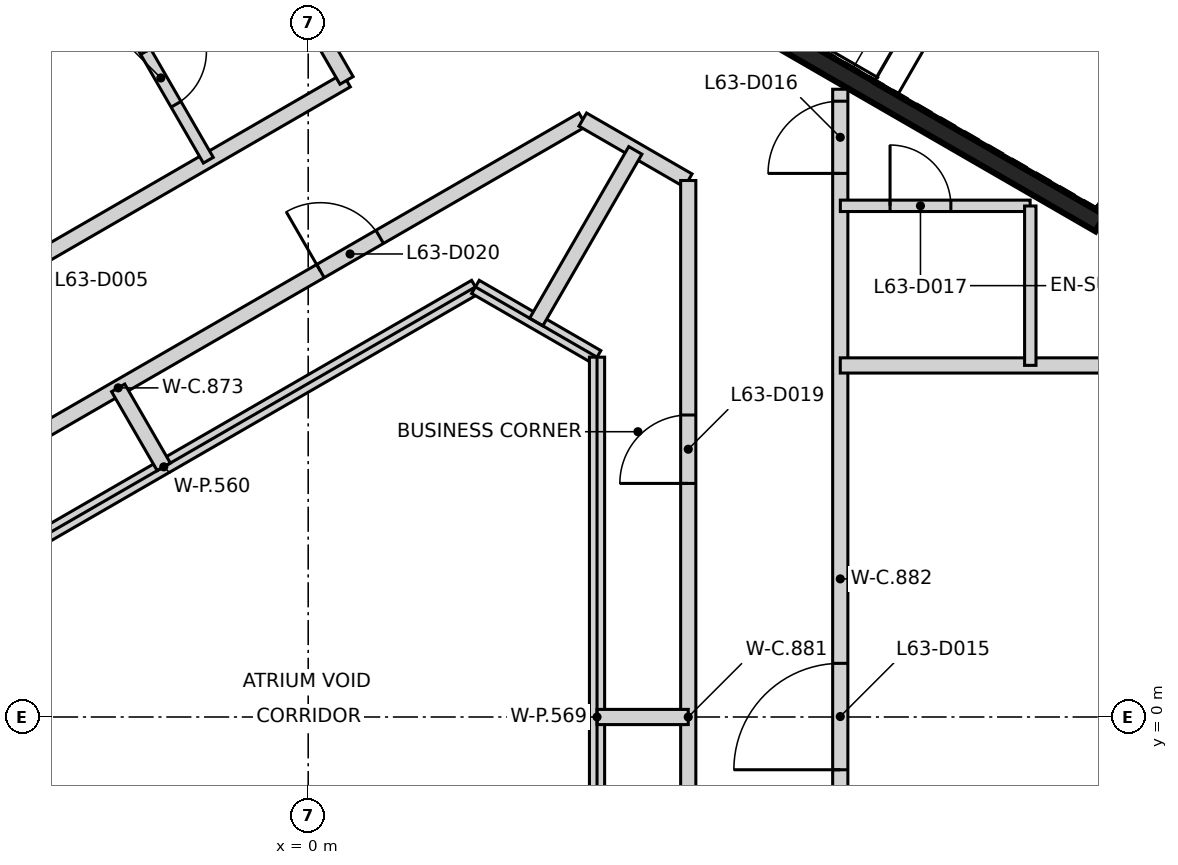
"""IFC4 building model, lengths in metres.
Left out: names, types, materials, properties, quantities, classifications, styles, units other than length and angle.
Written with IfcOpenShell. Run it as: python <this file> out.ifc"""

import sys

from ifc_helpers import new_model, si_unit, direction, frame, frame_2d, origin, place, context, subcontext, project, spatial, rectangle, extrude, element, fill, save


model = new_model("IFC4")
c1 = context("Model", 3, precision=1e-05, world=origin(), true_north=direction((0.0, 1.0)))
c2 = subcontext(c1, "Body", "Model", "MODEL_VIEW")
j1 = project(units=[si_unit("LENGTHUNIT", "METRE"), si_unit("PLANEANGLEUNIT", "RADIAN")], contexts=[c1])
p1 = place(None, origin())
s1 = spatial("IfcSite", under=j1, at=p1, CompositionType="ELEMENT")
p2 = place(p1, origin())
s2 = spatial("IfcBuilding", under=s1, at=p2, CompositionType="ELEMENT")
p3 = place(p2, frame((0.0, 0.0, 250.2)))
s3 = spatial("IfcBuildingStorey", under=s2, at=p3, CompositionType="ELEMENT", Elevation=250.2)
p4 = place(p3, frame((10.42, 6.498, 0.0), z_axis=(0.0, 0.0, 1.0), x_axis=(-0.866021906294, 0.500006057782, 0.0)))
e1 = element("IfcWall", 1, at=p4, inside=s3, PredefinedType="SHEAR", context=c2, shape_type="SweptSolid", body=[
    extrude(rectangle(XDim=11.55, YDim=0.25, at=frame_2d((5.775, 0.0))), origin(), (0.0, 0.0, 1.0), 3.25),
])
p5 = place(p4, frame((10.025, 0.0, 0.0)))
e2 = element("IfcOpeningElement", 2, at=p5, cuts=e1, PredefinedType="OPENING", context=c2, shape_type="SweptSolid", body=[
    extrude(rectangle(XDim=1.2, YDim=2.1, at=frame_2d((0.6, 1.05))), frame((0.0, 0.135, 0.0), z_axis=(0.0, -1.0, 0.0), x_axis=(1.0, 0.0, 0.0)), (0.0, 0.0, 1.0), 0.27),
])
p6 = place(p4, frame((8.725, 0.0, 0.0)))
e3 = element("IfcOpeningElement", 3, at=p6, cuts=e1, PredefinedType="OPENING", context=c2, shape_type="SweptSolid", body=[
    extrude(rectangle(XDim=1.2, YDim=2.1, at=frame_2d((0.6, 1.05))), frame((0.0, 0.135, 0.0), z_axis=(0.0, -1.0, 0.0), x_axis=(1.0, 0.0, 0.0)), (0.0, 0.0, 1.0), 0.27),
])
p7 = place(p3, frame((13.238, 11.378, 0.0), z_axis=(0.0, 0.0, 1.0), x_axis=(-0.500008851346, -0.866020293397, 0.0)))
e4 = element("IfcWall", 4, at=p7, inside=s3, PredefinedType="SHEAR", context=c2, shape_type="SweptSolid", body=[
    extrude(rectangle(XDim=5.51, YDim=0.25, at=frame_2d((2.755, 0.0))), origin(), (0.0, 0.0, 1.0), 3.25),
])
p8 = place(p3, frame((-10.652, 1.928, 0.0), z_axis=(0.0, 0.0, 1.0), x_axis=(0.865793573301, 0.500401327367, 0.0)))
e5 = element("IfcWall", 5, at=p8, inside=s3, PredefinedType="PARTITIONING", context=c2, shape_type="SweptSolid", body=[
    extrude(rectangle(XDim=12.886, YDim=0.2, at=frame_2d((6.443, 0.0))), origin(), (0.0, 0.0, 1.0), 3.25),
])
p9 = place(p8, frame((7.123, 0.0, 0.0)))
e6 = element("IfcOpeningElement", 6, at=p9, cuts=e5, PredefinedType="OPENING", context=c2, shape_type="SweptSolid", body=[
    extrude(rectangle(XDim=0.95, YDim=2.1, at=frame_2d((0.475, 1.05))), frame((0.0, 0.11, 0.0), z_axis=(0.0, -1.0, 0.0), x_axis=(1.0, 0.0, 0.0)), (0.0, 0.0, 1.0), 0.22),
])
p10 = place(p8, frame((0.16, 0.0, 0.0)))
e7 = element("IfcOpeningElement", 7, at=p10, cuts=e5, PredefinedType="OPENING", context=c2, shape_type="SweptSolid", body=[
    extrude(rectangle(XDim=0.95, YDim=2.1, at=frame_2d((0.475, 1.05))), frame((0.0, 0.11, 0.0), z_axis=(0.0, -1.0, 0.0), x_axis=(1.0, 0.0, 0.0)), (0.0, 0.0, 1.0), 0.22),
])
p11 = place(p3, frame((-8.612, -0.801, 0.0), z_axis=(0.0, 0.0, 1.0), x_axis=(0.865998070783, -0.50004733916, 0.0)))
e8 = element("IfcWall", 8, at=p11, inside=s3, PredefinedType="PARTITIONING", context=c2, shape_type="SweptSolid", body=[
    extrude(rectangle(XDim=14.115, YDim=0.2, at=frame_2d((7.058, 0.0))), origin(), (0.0, 0.0, 1.0), 3.25),
])
p12 = place(p11, frame((3.085, 0.0, 0.0)))
e9 = element("IfcOpeningElement", 9, at=p12, cuts=e8, PredefinedType="OPENING", context=c2, shape_type="SweptSolid", body=[
    extrude(rectangle(XDim=0.9, YDim=2.1, at=frame_2d((0.45, 1.05))), frame((0.0, 0.11, 0.0), z_axis=(0.0, -1.0, 0.0), x_axis=(1.0, 0.0, 0.0)), (0.0, 0.0, 1.0), 0.22),
])
p13 = place(p11, frame((10.131, 0.0, 0.0)))
e10 = element("IfcOpeningElement", 10, at=p13, cuts=e8, PredefinedType="OPENING", context=c2, shape_type="SweptSolid", body=[
    extrude(rectangle(XDim=0.9, YDim=2.1, at=frame_2d((0.45, 1.05))), frame((0.0, 0.11, 0.0), z_axis=(0.0, -1.0, 0.0), x_axis=(1.0, 0.0, 0.0)), (0.0, 0.0, 1.0), 0.22),
])
p14 = place(p3, frame((-8.612, 0.801, 0.0), z_axis=(0.0, 0.0, 1.0), x_axis=(0.866005560651, 0.500034367741, 0.0)))
e11 = element("IfcWall", 11, at=p14, inside=s3, PredefinedType="PARTITIONING", context=c2, shape_type="SweptSolid", body=[
    extrude(rectangle(XDim=14.115, YDim=0.2, at=frame_2d((7.058, 0.0))), origin(), (0.0, 0.0, 1.0), 3.25),
])
p15 = place(p14, frame((10.131, 0.0, 0.0)))
e12 = element("IfcOpeningElement", 12, at=p15, cuts=e11, PredefinedType="OPENING", context=c2, shape_type="SweptSolid", body=[
    extrude(rectangle(XDim=0.9, YDim=2.1, at=frame_2d((0.45, 1.05))), frame((0.0, 0.11, 0.0), z_axis=(0.0, -1.0, 0.0), x_axis=(1.0, 0.0, 0.0)), (0.0, 0.0, 1.0), 0.22),
])
p16 = place(p14, frame((3.085, 0.0, 0.0)))
e13 = element("IfcOpeningElement", 13, at=p16, cuts=e11, PredefinedType="OPENING", context=c2, shape_type="SweptSolid", body=[
    extrude(rectangle(XDim=0.9, YDim=2.1, at=frame_2d((0.45, 1.05))), frame((0.0, 0.11, 0.0), z_axis=(0.0, -1.0, 0.0), x_axis=(1.0, 0.0, 0.0)), (0.0, 0.0, 1.0), 0.22),
])
p17 = place(p3, frame((-2.483, 13.551, 0.0), z_axis=(0.0, 0.0, 1.0), x_axis=(0.499878046143, -0.866095802429, 0.0)))
e14 = element("IfcWall", 14, at=p17, inside=s3, PredefinedType="PARTITIONING", context=c2, shape_type="SweptSolid", body=[
    extrude(rectangle(XDim=5.977, YDim=0.2, at=frame_2d((2.988, 0.0))), origin(), (0.0, 0.0, 1.0), 3.25),
])
p18 = place(p17, frame((2.327, 0.0, 0.0)))
e15 = element("IfcOpeningElement", 15, at=p18, cuts=e14, PredefinedType="OPENING", context=c2, shape_type="SweptSolid", body=[
    extrude(rectangle(XDim=0.95, YDim=2.1, at=frame_2d((0.475, 1.05))), frame((0.0, 0.11, 0.0), z_axis=(0.0, -1.0, 0.0), x_axis=(1.0, 0.0, 0.0)), (0.0, 0.0, 1.0), 0.22),
])
p19 = place(p3, frame((3.612, 7.859, 0.0), z_axis=(0.0, 0.0, 1.0), x_axis=(0.866002901518, -0.500038973044, 0.0)))
e16 = element("IfcWall", 16, at=p19, inside=s3, PredefinedType="PARTITIONING", context=c2, shape_type="SweptSolid", body=[
    extrude(rectangle(XDim=1.602, YDim=0.2, at=frame_2d((0.801, 0.0))), origin(), (0.0, 0.0, 1.0), 3.25),
])
p20 = place(p3, frame((5.0, -7.058, 0.0), z_axis=(0.0, 0.0, 1.0), x_axis=(0.0, 1.0, 0.0)))
e17 = element("IfcWall", 17, at=p20, inside=s3, PredefinedType="PARTITIONING", context=c2, shape_type="SweptSolid", body=[
    extrude(rectangle(XDim=14.116, YDim=0.2, at=frame_2d((7.058, 0.0))), origin(), (0.0, 0.0, 1.0), 3.25),
])
p21 = place(p20, frame((3.085, 0.0, 0.0)))
e18 = element("IfcOpeningElement", 18, at=p21, cuts=e17, PredefinedType="OPENING", context=c2, shape_type="SweptSolid", body=[
    extrude(rectangle(XDim=0.9, YDim=2.1, at=frame_2d((0.45, 1.05))), frame((0.0, 0.11, 0.0), z_axis=(0.0, -1.0, 0.0), x_axis=(1.0, 0.0, 0.0)), (0.0, 0.0, 1.0), 0.22),
])
p22 = place(p20, frame((10.131, 0.0, 0.0)))
e19 = element("IfcOpeningElement", 19, at=p22, cuts=e17, PredefinedType="OPENING", context=c2, shape_type="SweptSolid", body=[
    extrude(rectangle(XDim=0.9, YDim=2.1, at=frame_2d((0.45, 1.05))), frame((0.0, 0.11, 0.0), z_axis=(0.0, -1.0, 0.0), x_axis=(1.0, 0.0, 0.0)), (0.0, 0.0, 1.0), 0.22),
])
p23 = place(p3, frame((7.0, -4.625, 0.0), z_axis=(0.0, 0.0, 1.0), x_axis=(0.0, 1.0, 0.0)))
e20 = element("IfcWall", 20, at=p23, inside=s3, PredefinedType="PARTITIONING", context=c2, shape_type="SweptSolid", body=[
    extrude(rectangle(XDim=12.884, YDim=0.2, at=frame_2d((6.442, 0.0))), origin(), (0.0, 0.0, 1.0), 3.25),
])
p24 = place(p23, frame((3.931, 0.0, 0.0)))
e21 = element("IfcOpeningElement", 21, at=p24, cuts=e20, PredefinedType="OPENING", context=c2, shape_type="SweptSolid", body=[
    extrude(rectangle(XDim=1.4, YDim=2.1, at=frame_2d((0.7, 1.05))), frame((0.0, 0.11, 0.0), z_axis=(0.0, -1.0, 0.0), x_axis=(1.0, 0.0, 0.0)), (0.0, 0.0, 1.0), 0.22),
])
p25 = place(p23, frame((11.777, 0.0, 0.0)))
e22 = element("IfcOpeningElement", 22, at=p25, cuts=e20, PredefinedType="OPENING", context=c2, shape_type="SweptSolid", body=[
    extrude(rectangle(XDim=0.95, YDim=2.1, at=frame_2d((0.475, 1.05))), frame((0.0, 0.11, 0.0), z_axis=(0.0, -1.0, 0.0), x_axis=(1.0, 0.0, 0.0)), (0.0, 0.0, 1.0), 0.22),
])
for number, where, z_axis, x_axis in (
    (23, (-6.0, -0.924, 0.0), (0.0, 0.0, 1.0), (0.866, -0.5, 0.0)),
    (24, (-6.0, 0.924, 0.0), (0.0, 0.0, 1.0), (0.866, 0.5, 0.0)),
):
    element("IfcWall", number, at=place(p3, frame(where, z_axis=z_axis, x_axis=x_axis)), inside=s3, PredefinedType="PARTITIONING", context=c2, shape_type="SweptSolid", body=[
        extrude(rectangle(XDim=9.468, YDim=0.2, at=frame_2d((4.734, 0.0))), origin(), (0.0, 0.0, 1.0), 3.25),
    ])
p26 = place(p3, frame((-2.5, 4.33, 0.0), z_axis=(0.0, 0.0, 1.0), x_axis=(0.499969057507, -0.866043267704, 0.0)))
e25 = element("IfcWall", 25, at=p26, inside=s3, PredefinedType="PARTITIONING", context=c2, shape_type="SweptSolid", body=[
    extrude(rectangle(XDim=1.2, YDim=0.2, at=frame_2d((0.6, 0.0))), origin(), (0.0, 0.0, 1.0), 3.25),
])
p27 = place(p3, frame((2.2, 5.658, 0.0), z_axis=(0.0, 0.0, 1.0), x_axis=(0.865818011038, -0.500359042851, 0.0)))
e26 = element("IfcWall", 26, at=p27, inside=s3, PredefinedType="PARTITIONING", context=c2, shape_type="SweptSolid", body=[
    extrude(rectangle(XDim=1.848, YDim=0.2, at=frame_2d((0.924, 0.0))), origin(), (0.0, 0.0, 1.0), 3.25),
])
p28 = place(p3, frame((3.0, 5.196, 0.0), z_axis=(0.0, 0.0, 1.0), x_axis=(0.500076354988, 0.865981315724, 0.0)))
e27 = element("IfcWall", 27, at=p28, inside=s3, PredefinedType="PARTITIONING", context=c2, shape_type="SweptSolid", body=[
    extrude(rectangle(XDim=2.607, YDim=0.2, at=frame_2d((1.304, 0.0))), origin(), (0.0, 0.0, 1.0), 3.25),
])
p29 = place(p3, frame((3.8, -4.734, 0.0), z_axis=(0.0, 0.0, 1.0), x_axis=(0.0, 1.0, 0.0)))
e28 = element("IfcWall", 28, at=p29, inside=s3, PredefinedType="PARTITIONING", context=c2, shape_type="SweptSolid", body=[
    extrude(rectangle(XDim=9.468, YDim=0.2, at=frame_2d((4.734, 0.0))), origin(), (0.0, 0.0, 1.0), 3.25),
])
p30 = place(p3, frame((3.8, 0.0, 0.0), z_axis=(0.0, 0.0, 1.0), x_axis=(1.0, 0.0, 0.0)))
e29 = element("IfcWall", 29, at=p30, inside=s3, PredefinedType="PARTITIONING", context=c2, shape_type="SweptSolid", body=[
    extrude(rectangle(XDim=1.2, YDim=0.2, at=frame_2d((0.6, 0.0))), origin(), (0.0, 0.0, 1.0), 3.25),
])
p31 = place(p3, frame((7.0, 4.625, 0.0), z_axis=(0.0, 0.0, 1.0), x_axis=(1.0, 0.0, 0.0)))
e30 = element("IfcWall", 30, at=p31, inside=s3, PredefinedType="PARTITIONING", context=c2, shape_type="SweptSolid", body=[
    extrude(rectangle(XDim=11.204, YDim=0.2, at=frame_2d((5.602, 0.0))), origin(), (0.0, 0.0, 1.0), 3.25),
])
p32 = place(p3, frame((-2.564, 9.49, 0.0), z_axis=(0.0, 0.0, 1.0), x_axis=(0.500004234368, -0.866022959057, 0.0)))
e31 = element("IfcWall", 31, at=p32, inside=s3, PredefinedType="PARTITIONING", context=c2, shape_type="SweptSolid", body=[
    extrude(rectangle(XDim=2.5, YDim=0.15, at=frame_2d((1.25, 0.0))), origin(), (0.0, 0.0, 1.0), 3.25),
])
p33 = place(p32, frame((0.85, 0.0, 0.0)))
e32 = element("IfcOpeningElement", 32, at=p33, cuts=e31, PredefinedType="OPENING", context=c2, shape_type="SweptSolid", body=[
    extrude(rectangle(XDim=0.8, YDim=2.1, at=frame_2d((0.4, 1.05))), frame((0.0, 0.085, 0.0), z_axis=(0.0, -1.0, 0.0), x_axis=(1.0, 0.0, 0.0)), (0.0, 0.0, 1.0), 0.17),
])
p34 = place(p3, frame((7.001, 6.725, 0.0), z_axis=(0.0, 0.0, 1.0), x_axis=(1.0, 0.0, 0.0)))
e33 = element("IfcWall", 33, at=p34, inside=s3, PredefinedType="PARTITIONING", context=c2, shape_type="SweptSolid", body=[
    extrude(rectangle(XDim=2.497, YDim=0.15, at=frame_2d((1.249, 0.0))), origin(), (0.0, 0.0, 1.0), 3.25),
])
p35 = place(p34, frame((0.654, 0.0, 0.0)))
e34 = element("IfcOpeningElement", 34, at=p35, cuts=e33, PredefinedType="OPENING", context=c2, shape_type="SweptSolid", body=[
    extrude(rectangle(XDim=0.8, YDim=2.1, at=frame_2d((0.4, 1.05))), frame((0.0, 0.085, 0.0), z_axis=(0.0, -1.0, 0.0), x_axis=(1.0, 0.0, 0.0)), (0.0, 0.0, 1.0), 0.17),
])
p36 = place(p3, frame((9.5, 4.626, 0.0), z_axis=(0.0, 0.0, 1.0), x_axis=(0.0, 1.0, 0.0)))
e35 = element("IfcWall", 35, at=p36, inside=s3, PredefinedType="PARTITIONING", context=c2, shape_type="SweptSolid", body=[
    extrude(rectangle(XDim=2.097, YDim=0.15, at=frame_2d((1.048, 0.0))), origin(), (0.0, 0.0, 1.0), 3.25),
])
p37 = place(p33, frame((0.8, 0.0, 0.0), z_axis=(0.0, 0.0, 1.0), x_axis=(-1.0, 0.0, 0.0)))
e36 = element("IfcDoor", 36, at=p37, inside=s3, OperationType="SINGLE_SWING_LEFT", PredefinedType="DOOR", context=c2, shape_type="SweptSolid", body=[
    extrude(rectangle(XDim=0.8, YDim=2.1, at=frame_2d((0.4, 1.05))), frame((0.0, 0.025, 0.0), z_axis=(0.0, -1.0, 0.0), x_axis=(1.0, 0.0, 0.0)), (0.0, 0.0, 1.0), 0.05),
])
fill(e32, e36)
p38 = place(p24, frame((1.4, 0.0, 0.0), z_axis=(0.0, 0.0, 1.0), x_axis=(-1.0, 0.0, 0.0)))
e37 = element("IfcDoor", 37, at=p38, inside=s3, OperationType="DOUBLE_DOOR_SINGLE_SWING", PredefinedType="DOOR", context=c2, shape_type="SweptSolid", body=[
    extrude(rectangle(XDim=1.4, YDim=2.1, at=frame_2d((0.7, 1.05))), frame((0.0, 0.025, 0.0), z_axis=(0.0, -1.0, 0.0), x_axis=(1.0, 0.0, 0.0)), (0.0, 0.0, 1.0), 0.05),
])
fill(e21, e37)
p39 = place(p25, frame((0.95, 0.0, 0.0), z_axis=(0.0, 0.0, 1.0), x_axis=(-1.0, 0.0, 0.0)))
e38 = element("IfcDoor", 38, at=p39, inside=s3, OperationType="SINGLE_SWING_LEFT", PredefinedType="DOOR", context=c2, shape_type="SweptSolid", body=[
    extrude(rectangle(XDim=0.95, YDim=2.1, at=frame_2d((0.475, 1.05))), frame((0.0, 0.025, 0.0), z_axis=(0.0, -1.0, 0.0), x_axis=(1.0, 0.0, 0.0)), (0.0, 0.0, 1.0), 0.05),
])
fill(e22, e38)
p40 = place(p35, origin())
e39 = element("IfcDoor", 39, at=p40, inside=s3, OperationType="SINGLE_SWING_LEFT", PredefinedType="DOOR", context=c2, shape_type="SweptSolid", body=[
    extrude(rectangle(XDim=0.8, YDim=2.1, at=frame_2d((0.4, 1.05))), frame((0.0, 0.025, 0.0), z_axis=(0.0, -1.0, 0.0), x_axis=(1.0, 0.0, 0.0)), (0.0, 0.0, 1.0), 0.05),
])
fill(e34, e39)
p41 = place(p22, origin())
e40 = element("IfcDoor", 40, at=p41, inside=s3, OperationType="SINGLE_SWING_LEFT", PredefinedType="DOOR", context=c2, shape_type="SweptSolid", body=[
    extrude(rectangle(XDim=0.9, YDim=2.1, at=frame_2d((0.45, 1.05))), frame((0.0, 0.025, 0.0), z_axis=(0.0, -1.0, 0.0), x_axis=(1.0, 0.0, 0.0)), (0.0, 0.0, 1.0), 0.05),
])
fill(e19, e40)
p42 = place(p15, frame((0.9, 0.0, 0.0), z_axis=(0.0, 0.0, 1.0), x_axis=(-1.0, 0.0, 0.0)))
e41 = element("IfcDoor", 41, at=p42, inside=s3, OperationType="SINGLE_SWING_LEFT", PredefinedType="DOOR", context=c2, shape_type="SweptSolid", body=[
    extrude(rectangle(XDim=0.9, YDim=2.1, at=frame_2d((0.45, 1.05))), frame((0.0, 0.025, 0.0), z_axis=(0.0, -1.0, 0.0), x_axis=(1.0, 0.0, 0.0)), (0.0, 0.0, 1.0), 0.05),
])
fill(e12, e41)
save(model, sys.argv[1])
